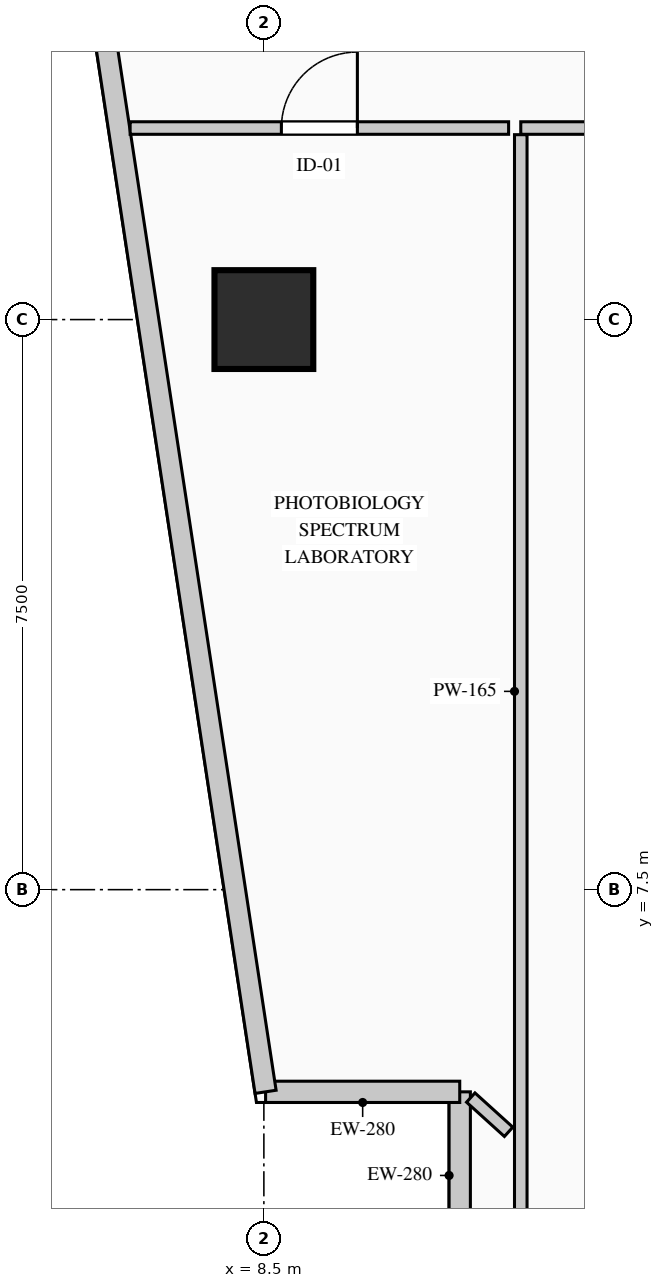
"""IFC4 building model, lengths in metres.
Left out: names, types, materials, properties, quantities, classifications, styles, units other than length and angle.
Written with IfcOpenShell. Run it as: python <this file> out.ifc"""

import sys

from ifc_helpers import new_model, si_unit, direction, frame, frame_2d, origin, origin_2d, place, context, subcontext, project, spatial, rectangle, extrude, element, fill, save


model = new_model("IFC4")
c1 = context("Model", 3, precision=1e-05, world=origin(), true_north=direction((0.0, 1.0)))
c2 = subcontext(c1, "Body", "Model", "MODEL_VIEW")
j1 = project(units=[si_unit("LENGTHUNIT", "METRE"), si_unit("PLANEANGLEUNIT", "RADIAN")], contexts=[c1])
p1 = place(None, origin())
s1 = spatial("IfcSite", under=j1, at=p1, CompositionType="ELEMENT")
p2 = place(p1, origin())
s2 = spatial("IfcBuilding", under=s1, at=p2, CompositionType="ELEMENT")
p3 = place(p2, frame((0.0, 0.0, 66.6)))
s3 = spatial("IfcBuildingStorey", under=s2, at=p3, CompositionType="ELEMENT", Elevation=66.6)
p4 = place(p3, frame((8.5, 15.0, 0.0), z_axis=(0.0, 0.0, 1.0), x_axis=(1.0, 0.0, 0.0)))
e1 = element("IfcColumn", 1, at=p4, inside=s3, PredefinedType="COLUMN", context=c2, shape_type="SweptSolid", body=[
    extrude(rectangle(XDim=1.3, YDim=1.3, at=origin_2d()), origin(), (0.0, 0.0, 1.0), 4.4),
])
p5 = place(p3, frame((11.077, 2.64, 0.0), z_axis=(0.0, 0.0, 1.0), x_axis=(0.0, 1.0, 0.0)))
e2 = element("IfcWall", 2, at=p5, inside=s3, PredefinedType="STANDARD", context=c2, shape_type="SweptSolid", body=[
    extrude(rectangle(XDim=2.2, YDim=0.28, at=frame_2d((1.1, 0.0))), origin(), (0.0, 0.0, 1.0), 4.1),
])
p6 = place(p3, frame((11.077, 4.84, 0.0), z_axis=(0.0, 0.0, 1.0), x_axis=(-1.0, 0.0, 0.0)))
e3 = element("IfcWall", 3, at=p6, inside=s3, PredefinedType="STANDARD", context=c2, shape_type="SweptSolid", body=[
    extrude(rectangle(XDim=2.554, YDim=0.28, at=frame_2d((1.277, 0.0))), origin(), (0.0, 0.0, 1.0), 4.1),
])
p7 = place(p3, frame((8.523, 4.84, 0.0), z_axis=(0.0, 0.0, 1.0), x_axis=(-0.150394554312, 0.988626055712, 0.0)))
e4 = element("IfcWall", 4, at=p7, inside=s3, PredefinedType="STANDARD", context=c2, shape_type="SweptSolid", body=[
    extrude(rectangle(XDim=36.738, YDim=0.28, at=frame_2d((18.369, 0.0))), origin(), (0.0, 0.0, 1.0), 4.1),
])
p8 = place(p7, frame((22.612, 0.0, 0.9)))
e5 = element("IfcOpeningElement", 5, at=p8, cuts=e4, PredefinedType="OPENING", context=c2, shape_type="SweptSolid", body=[
    extrude(rectangle(XDim=1.8, YDim=2.1, at=frame_2d((0.9, 1.05))), frame((0.0, 0.15, 0.0), z_axis=(0.0, -1.0, 0.0), x_axis=(1.0, 0.0, 0.0)), (0.0, 0.0, 1.0), 0.3),
])
p9 = place(p3, frame((11.88, 17.52, 0.0), z_axis=(0.0, 0.0, 1.0), x_axis=(1.0, 0.0, 0.0)))
e6 = element("IfcWall", 6, at=p9, inside=s3, PredefinedType="PARTITIONING", context=c2, shape_type="SweptSolid", body=[
    extrude(rectangle(XDim=9.44, YDim=0.165, at=frame_2d((4.72, 0.0))), origin(), (0.0, 0.0, 1.0), 4.1),
])
p10 = place(p9, frame((4.22, 0.0, 0.0)))
e7 = element("IfcOpeningElement", 7, at=p10, cuts=e6, PredefinedType="OPENING", context=c2, shape_type="SweptSolid", body=[
    extrude(rectangle(XDim=1.0, YDim=2.15, at=frame_2d((0.5, 1.075))), frame((0.0, 0.093, 0.0), z_axis=(0.0, -1.0, 0.0), x_axis=(1.0, 0.0, 0.0)), (0.0, 0.0, 1.0), 0.185),
])
p11 = place(p3, frame((11.88, 2.785, 0.0), z_axis=(0.0, 0.0, 1.0), x_axis=(0.0, 1.0, 0.0)))
e8 = element("IfcWall", 8, at=p11, inside=s3, PredefinedType="PARTITIONING", context=c2, shape_type="SweptSolid", body=[
    extrude(rectangle(XDim=14.648, YDim=0.165, at=frame_2d((7.324, 0.0))), origin(), (0.0, 0.0, 1.0), 4.1),
])
p12 = place(p3, frame((11.72, 4.314, 0.0), z_axis=(0.0, 0.0, 1.0), x_axis=(-0.741303295748, 0.671170189827, 0.0)))
e9 = element("IfcWall", 9, at=p12, inside=s3, PredefinedType="PARTITIONING", context=c2, shape_type="SweptSolid", body=[
    extrude(rectangle(XDim=0.672, YDim=0.165, at=frame_2d((0.336, 0.0))), origin(), (0.0, 0.0, 1.0), 4.1),
])
p13 = place(p3, frame((6.74, 17.52, 0.0), z_axis=(0.0, 0.0, 1.0), x_axis=(1.0, 0.0, 0.0)))
e10 = element("IfcWall", 10, at=p13, inside=s3, PredefinedType="PARTITIONING", context=c2, shape_type="SweptSolid", body=[
    extrude(rectangle(XDim=4.979, YDim=0.165, at=frame_2d((2.49, 0.0))), origin(), (0.0, 0.0, 1.0), 4.1),
])
p14 = place(p13, frame((1.99, 0.0, 0.0)))
e11 = element("IfcOpeningElement", 11, at=p14, cuts=e10, PredefinedType="OPENING", context=c2, shape_type="SweptSolid", body=[
    extrude(rectangle(XDim=1.0, YDim=2.15, at=frame_2d((0.5, 1.075))), frame((0.0, 0.093, 0.0), z_axis=(0.0, -1.0, 0.0), x_axis=(1.0, 0.0, 0.0)), (0.0, 0.0, 1.0), 0.185),
])
p15 = place(p14, origin())
e12 = element("IfcDoor", 12, at=p15, inside=s3, OperationType="SINGLE_SWING_RIGHT", PredefinedType="DOOR", context=c2, shape_type="SweptSolid", body=[
    extrude(rectangle(XDim=1.0, YDim=2.15, at=frame_2d((0.5, 1.075))), frame((0.0, 0.025, 0.0), z_axis=(0.0, -1.0, 0.0), x_axis=(1.0, 0.0, 0.0)), (0.0, 0.0, 1.0), 0.05),
])
fill(e11, e12)
save(model, sys.argv[1])
